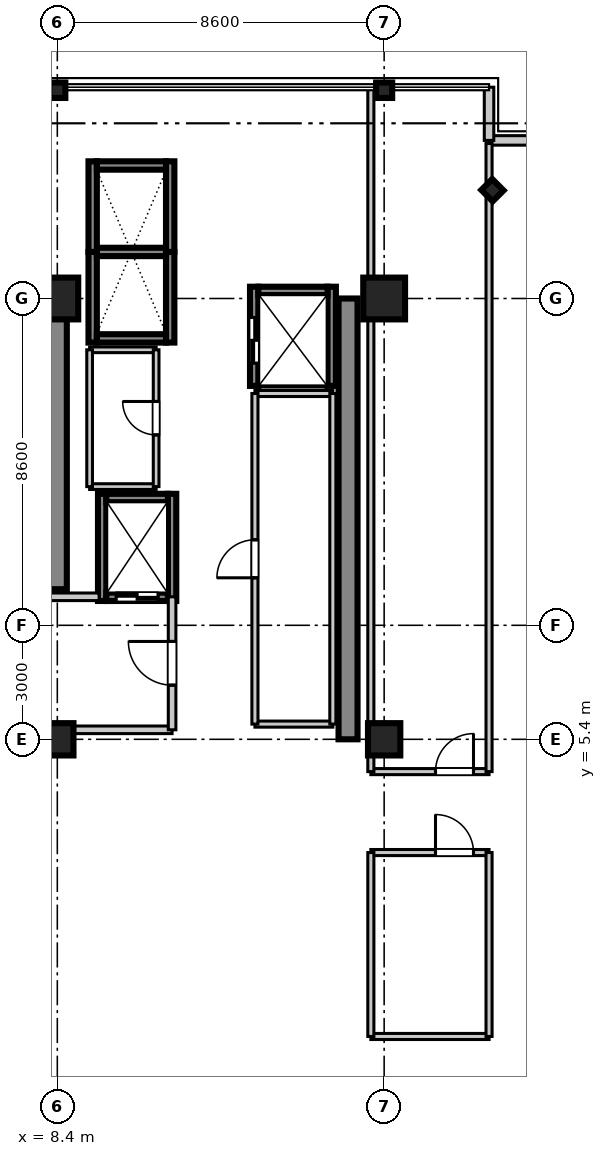
"""IFC4 building model, lengths in metres.
Left out: names, types, materials, properties, quantities, classifications, styles, units other than length and angle.
Written with IfcOpenShell. Run it as: python <this file> out.ifc"""

import sys

from ifc_helpers import new_model, si_unit, direction, frame, frame_2d, origin, origin_2d, place, context, subcontext, project, spatial, rectangle, i_section, extrude, source, transform, mapped, element, fill, save


model = new_model("IFC4")
c1 = context("Model", 3, precision=1e-05, world=origin(), true_north=direction((0.0, 1.0)))
c2 = subcontext(c1, "Body", "Model", "MODEL_VIEW")
j1 = project(units=[si_unit("LENGTHUNIT", "METRE"), si_unit("PLANEANGLEUNIT", "RADIAN")], contexts=[c1])
p1 = place(None, origin())
s1 = spatial("IfcSite", under=j1, at=p1, CompositionType="ELEMENT")
p2 = place(p1, origin())
s2 = spatial("IfcBuilding", under=s1, at=p2, CompositionType="ELEMENT")
p3 = place(p2, frame((0.0, 0.0, 192.8)))
s3 = spatial("IfcBuildingStorey", under=s2, at=p3, CompositionType="ELEMENT", Elevation=192.8)
m1 = source(origin(), c2, "Body", "SweptSolid", [
    extrude(rectangle(XDim=0.85, YDim=0.85, at=origin_2d()), origin(), (0.0, 0.0, 1.0), 3.605),
])
p4 = place(p3, frame((8.4, 5.4, 0.0), z_axis=(0.0, 0.0, 1.0), x_axis=(1.0, 0.0, 0.0)))
e1 = element("IfcColumn", 1, at=p4, inside=s3, PredefinedType="PILASTER", context=c2, shape_type="MappedRepresentation", body=[
    mapped(m1, transform((0.0, 0.0, 0.0), scale=1.0)),
])
m2 = source(origin(), c2, "Body", "SweptSolid", [
    extrude(rectangle(XDim=1.1, YDim=1.1, at=origin_2d()), origin(), (0.0, 0.0, 1.0), 3.605),
])
p5 = place(p3, frame((8.4, 17.0, 0.0), z_axis=(0.0, 0.0, 1.0), x_axis=(1.0, 0.0, 0.0)))
e2 = element("IfcColumn", 2, at=p5, inside=s3, PredefinedType="COLUMN", context=c2, shape_type="MappedRepresentation", body=[
    mapped(m2, transform((0.0, 0.0, 0.0), scale=1.0)),
])
p6 = place(p3, frame((17.0, 5.4, 0.0), z_axis=(0.0, 0.0, 1.0), x_axis=(1.0, 0.0, 0.0)))
e3 = element("IfcColumn", 3, at=p6, inside=s3, PredefinedType="PILASTER", context=c2, shape_type="MappedRepresentation", body=[
    mapped(m1, transform((0.0, 0.0, 0.0), scale=1.0)),
])
p7 = place(p3, frame((17.0, 17.0, 0.0), z_axis=(0.0, 0.0, 1.0), x_axis=(1.0, 0.0, 0.0)))
e4 = element("IfcColumn", 4, at=p7, inside=s3, PredefinedType="COLUMN", context=c2, shape_type="MappedRepresentation", body=[
    mapped(m2, transform((0.0, 0.0, 0.0), scale=1.0)),
])
m3 = source(origin(), c2, "Body", "SweptSolid", [
    extrude(i_section(OverallWidth=0.406, OverallDepth=0.422, WebThickness=0.019, FlangeThickness=0.03, at=origin_2d()), origin(), (0.0, 0.0, 1.0), 3.605),
])
for number, where, z_axis, x_axis in (
    (5, (8.4, 22.48, 0.0), (0.0, 0.0, 1.0), (0.0, 1.0, 0.0)),
    (6, (17.0, 22.48, 0.0), (0.0, 0.0, 1.0), (0.0, 1.0, 0.0)),
    (7, (19.85, 19.85, 0.0), (0.0, 0.0, 1.0), (0.707, 0.707, 0.0)),
):
    element("IfcColumn", number, at=place(p3, frame(where, z_axis=z_axis, x_axis=x_axis)), inside=s3, PredefinedType="COLUMN", context=c2, shape_type="MappedRepresentation", body=[
        mapped(m3, transform((0.0, 0.0, 0.0), scale=1.0)),
    ])
m4 = source(origin(), c2, "Body", "SweptSolid", [
    extrude(rectangle(XDim=7.65, YDim=0.5, at=frame_2d((3.825, 0.0))), origin(), (0.0, 0.0, 1.0), 3.39),
])
p8 = place(p3, frame((8.4, 9.35, 0.0), z_axis=(0.0, 0.0, 1.0), x_axis=(0.0, 1.0, 0.0)))
e8 = element("IfcWall", 8, at=p8, inside=s3, PredefinedType="SHEAR", context=c2, shape_type="MappedRepresentation", body=[
    mapped(m4, transform((0.0, 0.0, 0.0), scale=1.0)),
])
m5 = source(origin(), c2, "Body", "SweptSolid", [
    extrude(rectangle(XDim=11.6, YDim=0.5, at=frame_2d((5.8, 0.0))), origin(), (0.0, 0.0, 1.0), 3.39),
])
p9 = place(p3, frame((16.05, 5.4, 0.0), z_axis=(0.0, 0.0, 1.0), x_axis=(0.0, 1.0, 0.0)))
e9 = element("IfcWall", 9, at=p9, inside=s3, PredefinedType="SHEAR", context=c2, shape_type="MappedRepresentation", body=[
    mapped(m5, transform((0.0, 0.0, 0.0), scale=1.0)),
])
m6 = source(origin(), c2, "Body", "SweptSolid", [
    extrude(rectangle(XDim=2.385, YDim=0.22, at=frame_2d((1.192, 0.0))), origin(), (0.0, 0.0, 1.0), 3.39),
])
for number, where, z_axis, x_axis in (
    (10, (9.33, 15.84, 0.0), (0.0, 0.0, 1.0), (0.0, 1.0, 0.0)),
    (11, (11.37, 15.84, 0.0), (0.0, 0.0, 1.0), (0.0, 1.0, 0.0)),
):
    element("IfcWall", number, at=place(p3, frame(where, z_axis=z_axis, x_axis=x_axis)), inside=s3, PredefinedType="SHEAR", context=c2, shape_type="MappedRepresentation", body=[
        mapped(m6, transform((0.0, 0.0, 0.0), scale=1.0)),
    ])
m7 = source(origin(), c2, "Body", "SweptSolid", [
    extrude(rectangle(XDim=1.82, YDim=0.22, at=frame_2d((0.91, 0.0))), origin(), (0.0, 0.0, 1.0), 3.39),
])
p10 = place(p3, frame((9.44, 15.95, 0.0), z_axis=(0.0, 0.0, 1.0), x_axis=(1.0, 0.0, 0.0)))
e12 = element("IfcWall", 12, at=p10, inside=s3, PredefinedType="SHEAR", context=c2, shape_type="MappedRepresentation", body=[
    mapped(m7, transform((0.0, 0.0, 0.0), scale=1.0)),
])
m8 = source(origin(), c2, "Body", "SweptSolid", [
    extrude(rectangle(XDim=1.82, YDim=0.22, at=frame_2d((0.91, 0.0))), origin(), (0.0, 0.0, 1.0), 3.65),
])
p11 = place(p3, frame((9.44, 18.225, 0.0), z_axis=(0.0, 0.0, 1.0), x_axis=(1.0, 0.0, 0.0)))
e13 = element("IfcWall", 13, at=p11, inside=s3, PredefinedType="SHEAR", context=c2, shape_type="MappedRepresentation", body=[
    mapped(m8, transform((0.0, 0.0, 0.0), scale=1.0)),
])
for number, where, z_axis, x_axis in (
    (14, (9.33, 18.225, 0.0), (0.0, 0.0, 1.0), (0.0, 1.0, 0.0)),
    (15, (11.37, 18.225, 0.0), (0.0, 0.0, 1.0), (0.0, 1.0, 0.0)),
):
    element("IfcWall", number, at=place(p3, frame(where, z_axis=z_axis, x_axis=x_axis)), inside=s3, PredefinedType="SHEAR", context=c2, shape_type="MappedRepresentation", body=[
        mapped(m6, transform((0.0, 0.0, 0.0), scale=1.0)),
    ])
p12 = place(p3, frame((9.44, 20.5, 0.0), z_axis=(0.0, 0.0, 1.0), x_axis=(1.0, 0.0, 0.0)))
e16 = element("IfcWall", 16, at=p12, inside=s3, PredefinedType="SHEAR", context=c2, shape_type="MappedRepresentation", body=[
    mapped(m7, transform((0.0, 0.0, 0.0), scale=1.0)),
])
m9 = source(origin(), c2, "Body", "SweptSolid", [
    extrude(rectangle(XDim=2.82, YDim=0.22, at=frame_2d((1.41, 0.0))), origin(), (0.0, 0.0, 1.0), 3.39),
])
for number, where, z_axis, x_axis in (
    (17, (9.58, 9.04, 0.0), (0.0, 0.0, 1.0), (0.0, 1.0, 0.0)),
    (18, (11.42, 9.04, 0.0), (0.0, 0.0, 1.0), (0.0, 1.0, 0.0)),
):
    element("IfcWall", number, at=place(p3, frame(where, z_axis=z_axis, x_axis=x_axis)), inside=s3, PredefinedType="SHEAR", context=c2, shape_type="MappedRepresentation", body=[
        mapped(m9, transform((0.0, 0.0, 0.0), scale=1.0)),
    ])
m10 = source(origin(), c2, "Body", "SweptSolid", [
    extrude(rectangle(XDim=1.62, YDim=0.22, at=frame_2d((0.81, 0.0))), origin(), (0.0, 0.0, 1.0), 3.39),
])
p13 = place(p3, frame((9.69, 9.15, 0.0), z_axis=(0.0, 0.0, 1.0), x_axis=(1.0, 0.0, 0.0)))
e19 = element("IfcWall", 19, at=p13, inside=s3, PredefinedType="SHEAR", context=c2, shape_type="MappedRepresentation", body=[
    mapped(m10, transform((0.0, 0.0, 0.0), scale=1.0)),
])
p14 = place(p13, frame((0.26, 0.0, 0.0)))
e20 = element("IfcOpeningElement", 20, at=p14, cuts=e19, PredefinedType="OPENING", context=c2, shape_type="SweptSolid", body=[
    extrude(rectangle(XDim=1.1, YDim=2.2, at=frame_2d((0.55, 1.1))), frame((0.0, 0.12, 0.0), z_axis=(0.0, -1.0, 0.0), x_axis=(1.0, 0.0, 0.0)), (0.0, 0.0, 1.0), 0.24),
])
p15 = place(p3, frame((9.69, 11.75, 0.0), z_axis=(0.0, 0.0, 1.0), x_axis=(1.0, 0.0, 0.0)))
e21 = element("IfcWall", 21, at=p15, inside=s3, PredefinedType="SHEAR", context=c2, shape_type="MappedRepresentation", body=[
    mapped(m10, transform((0.0, 0.0, 0.0), scale=1.0)),
])
m11 = source(origin(), c2, "Body", "SweptSolid", [
    extrude(rectangle(XDim=2.61, YDim=0.22, at=frame_2d((1.305, 0.0))), origin(), (0.0, 0.0, 1.0), 3.39),
])
p16 = place(p3, frame((13.58, 14.7, 0.0), z_axis=(0.0, 0.0, 1.0), x_axis=(0.0, 1.0, 0.0)))
e22 = element("IfcWall", 22, at=p16, inside=s3, PredefinedType="SHEAR", context=c2, shape_type="MappedRepresentation", body=[
    mapped(m11, transform((0.0, 0.0, 0.0), scale=1.0)),
])
p17 = place(p16, frame((0.6, 0.0, 0.0)))
e23 = element("IfcOpeningElement", 23, at=p17, cuts=e22, PredefinedType="OPENING", context=c2, shape_type="SweptSolid", body=[
    extrude(rectangle(XDim=1.2, YDim=2.2, at=frame_2d((0.6, 1.1))), frame((0.0, 0.12, 0.0), z_axis=(0.0, -1.0, 0.0), x_axis=(1.0, 0.0, 0.0)), (0.0, 0.0, 1.0), 0.24),
])
p18 = place(p3, frame((15.62, 14.7, 0.0), z_axis=(0.0, 0.0, 1.0), x_axis=(0.0, 1.0, 0.0)))
e24 = element("IfcWall", 24, at=p18, inside=s3, PredefinedType="SHEAR", context=c2, shape_type="MappedRepresentation", body=[
    mapped(m11, transform((0.0, 0.0, 0.0), scale=1.0)),
])
p19 = place(p3, frame((13.69, 17.2, 0.0), z_axis=(0.0, 0.0, 1.0), x_axis=(1.0, 0.0, 0.0)))
e25 = element("IfcWall", 25, at=p19, inside=s3, PredefinedType="SHEAR", context=c2, shape_type="MappedRepresentation", body=[
    mapped(m7, transform((0.0, 0.0, 0.0), scale=1.0)),
])
m12 = source(origin(), c2, "Body", "SweptSolid", [
    extrude(rectangle(XDim=1.4, YDim=0.25, at=frame_2d((0.7, 0.0))), origin(), (0.0, 0.0, 1.0), 3.39),
])
p20 = place(p3, frame((19.76, 21.16, 0.0), z_axis=(0.0, 0.0, 1.0), x_axis=(1.0, 0.0, 0.0)))
e26 = element("IfcWall", 26, at=p20, inside=s3, PredefinedType="STANDARD", context=c2, shape_type="MappedRepresentation", body=[
    mapped(m12, transform((0.0, 0.0, 0.0), scale=1.0)),
])
m13 = source(origin(), c2, "Body", "SweptSolid", [
    extrude(rectangle(XDim=1.4, YDim=0.25, at=frame_2d((0.7, 0.0))), origin(), (0.0, 0.0, 1.0), 3.39),
])
p21 = place(p3, frame((19.76, 21.16, 0.0), z_axis=(0.0, 0.0, 1.0), x_axis=(0.0, 1.0, 0.0)))
e27 = element("IfcWall", 27, at=p21, inside=s3, PredefinedType="STANDARD", context=c2, shape_type="MappedRepresentation", body=[
    mapped(m13, transform((0.0, 0.0, 0.0), scale=1.0)),
])
m14 = source(origin(), c2, "Body", "SweptSolid", [
    extrude(rectangle(XDim=3.82, YDim=0.2, at=frame_2d((1.91, 0.0))), origin(), (0.0, 0.0, 1.0), 2.73),
])
p22 = place(p3, frame((7.6, 5.65, 0.0), z_axis=(0.0, 0.0, 1.0), x_axis=(1.0, 0.0, 0.0)))
e28 = element("IfcWall", 28, at=p22, inside=s3, PredefinedType="PARTITIONING", context=c2, shape_type="MappedRepresentation", body=[
    mapped(m14, transform((0.0, 0.0, 0.0), scale=1.0)),
])
m15 = source(origin(), c2, "Body", "SweptSolid", [
    extrude(rectangle(XDim=1.9, YDim=0.2, at=frame_2d((0.95, 0.0))), origin(), (0.0, 0.0, 1.0), 2.73),
])
p23 = place(p3, frame((7.6, 9.15, 0.0), z_axis=(0.0, 0.0, 1.0), x_axis=(1.0, 0.0, 0.0)))
e29 = element("IfcWall", 29, at=p23, inside=s3, PredefinedType="PARTITIONING", context=c2, shape_type="MappedRepresentation", body=[
    mapped(m15, transform((0.0, 0.0, 0.0), scale=1.0)),
])
m16 = source(origin(), c2, "Body", "SweptSolid", [
    extrude(rectangle(XDim=3.5, YDim=0.2, at=frame_2d((1.75, 0.0))), origin(), (0.0, 0.0, 1.0), 2.73),
])
p24 = place(p3, frame((11.42, 5.65, 0.0), z_axis=(0.0, 0.0, 1.0), x_axis=(0.0, 1.0, 0.0)))
e30 = element("IfcWall", 30, at=p24, inside=s3, PredefinedType="PARTITIONING", context=c2, shape_type="MappedRepresentation", body=[
    mapped(m16, transform((0.0, 0.0, 0.0), scale=1.0)),
])
p25 = place(p24, frame((1.175, 0.0, 0.0)))
e31 = element("IfcOpeningElement", 31, at=p25, cuts=e30, PredefinedType="OPENING", context=c2, shape_type="SweptSolid", body=[
    extrude(rectangle(XDim=1.15, YDim=2.15, at=frame_2d((0.575, 1.075))), frame((0.0, 0.11, 0.0), z_axis=(0.0, -1.0, 0.0), x_axis=(1.0, 0.0, 0.0)), (0.0, 0.0, 1.0), 0.22),
])
m17 = source(origin(), c2, "Body", "SweptSolid", [
    extrude(rectangle(XDim=1.75, YDim=0.15, at=frame_2d((0.875, 0.0))), origin(), (0.0, 0.0, 1.0), 2.73),
])
for number, where, z_axis, x_axis in (
    (32, (9.25, 12.05, 0.0), (0.0, 0.0, 1.0), (1.0, 0.0, 0.0)),
    (33, (9.25, 15.65, 0.0), (0.0, 0.0, 1.0), (1.0, 0.0, 0.0)),
):
    element("IfcWall", number, at=place(p3, frame(where, z_axis=z_axis, x_axis=x_axis)), inside=s3, PredefinedType="PARTITIONING", context=c2, shape_type="MappedRepresentation", body=[
        mapped(m17, transform((0.0, 0.0, 0.0), scale=1.0)),
    ])
m18 = source(origin(), c2, "Body", "SweptSolid", [
    extrude(rectangle(XDim=3.6, YDim=0.15, at=frame_2d((1.8, 0.0))), origin(), (0.0, 0.0, 1.0), 2.73),
])
p26 = place(p3, frame((9.25, 12.05, 0.0), z_axis=(0.0, 0.0, 1.0), x_axis=(0.0, 1.0, 0.0)))
e34 = element("IfcWall", 34, at=p26, inside=s3, PredefinedType="PARTITIONING", context=c2, shape_type="MappedRepresentation", body=[
    mapped(m18, transform((0.0, 0.0, 0.0), scale=1.0)),
])
p27 = place(p3, frame((11.0, 12.05, 0.0), z_axis=(0.0, 0.0, 1.0), x_axis=(0.0, 1.0, 0.0)))
e35 = element("IfcWall", 35, at=p27, inside=s3, PredefinedType="PARTITIONING", context=c2, shape_type="MappedRepresentation", body=[
    mapped(m18, transform((0.0, 0.0, 0.0), scale=1.0)),
])
p28 = place(p27, frame((1.36, 0.0, 0.0)))
e36 = element("IfcOpeningElement", 36, at=p28, cuts=e35, PredefinedType="OPENING", context=c2, shape_type="SweptSolid", body=[
    extrude(rectangle(XDim=0.88, YDim=2.1, at=frame_2d((0.44, 1.05))), frame((0.0, 0.085, 0.0), z_axis=(0.0, -1.0, 0.0), x_axis=(1.0, 0.0, 0.0)), (0.0, 0.0, 1.0), 0.17),
])
m19 = source(origin(), c2, "Body", "SweptSolid", [
    extrude(rectangle(XDim=2.05, YDim=0.16, at=frame_2d((1.025, 0.0))), origin(), (0.0, 0.0, 1.0), 2.73),
])
for number, where, z_axis, x_axis in (
    (37, (13.6, 5.8, 0.0), (0.0, 0.0, 1.0), (1.0, 0.0, 0.0)),
    (38, (13.6, 14.5, 0.0), (0.0, 0.0, 1.0), (1.0, 0.0, 0.0)),
):
    element("IfcWall", number, at=place(p3, frame(where, z_axis=z_axis, x_axis=x_axis)), inside=s3, PredefinedType="PARTITIONING", context=c2, shape_type="MappedRepresentation", body=[
        mapped(m19, transform((0.0, 0.0, 0.0), scale=1.0)),
    ])
m20 = source(origin(), c2, "Body", "SweptSolid", [
    extrude(rectangle(XDim=8.7, YDim=0.16, at=frame_2d((4.35, 0.0))), origin(), (0.0, 0.0, 1.0), 2.73),
])
p29 = place(p3, frame((13.6, 5.8, 0.0), z_axis=(0.0, 0.0, 1.0), x_axis=(0.0, 1.0, 0.0)))
e39 = element("IfcWall", 39, at=p29, inside=s3, PredefinedType="PARTITIONING", context=c2, shape_type="MappedRepresentation", body=[
    mapped(m20, transform((0.0, 0.0, 0.0), scale=1.0)),
])
p30 = place(p29, frame((3.85, 0.0, 0.0)))
e40 = element("IfcOpeningElement", 40, at=p30, cuts=e39, PredefinedType="OPENING", context=c2, shape_type="SweptSolid", body=[
    extrude(rectangle(XDim=1.0, YDim=2.1, at=frame_2d((0.5, 1.05))), frame((0.0, 0.09, 0.0), z_axis=(0.0, -1.0, 0.0), x_axis=(1.0, 0.0, 0.0)), (0.0, 0.0, 1.0), 0.18),
])
p31 = place(p3, frame((15.65, 5.8, 0.0), z_axis=(0.0, 0.0, 1.0), x_axis=(0.0, 1.0, 0.0)))
e41 = element("IfcWall", 41, at=p31, inside=s3, PredefinedType="PARTITIONING", context=c2, shape_type="MappedRepresentation", body=[
    mapped(m20, transform((0.0, 0.0, 0.0), scale=1.0)),
])
m21 = source(origin(), c2, "Body", "SweptSolid", [
    extrude(rectangle(XDim=3.11, YDim=0.16, at=frame_2d((1.555, 0.0))), origin(), (0.0, 0.0, 1.0), 2.73),
])
p32 = place(p3, frame((16.65, 4.55, 0.0), z_axis=(0.0, 0.0, 1.0), x_axis=(1.0, 0.0, 0.0)))
e42 = element("IfcWall", 42, at=p32, inside=s3, PredefinedType="PARTITIONING", context=c2, shape_type="MappedRepresentation", body=[
    mapped(m21, transform((0.0, 0.0, 0.0), scale=1.0)),
])
p33 = place(p32, frame((1.701, 0.0, 0.0)))
e43 = element("IfcOpeningElement", 43, at=p33, cuts=e42, PredefinedType="OPENING", context=c2, shape_type="SweptSolid", body=[
    extrude(rectangle(XDim=1.0, YDim=2.1, at=frame_2d((0.5, 1.05))), frame((0.0, 0.09, 0.0), z_axis=(0.0, -1.0, 0.0), x_axis=(1.0, 0.0, 0.0)), (0.0, 0.0, 1.0), 0.18),
])
m22 = source(origin(), c2, "Body", "SweptSolid", [
    extrude(rectangle(XDim=17.95, YDim=0.16, at=frame_2d((8.975, 0.0))), origin(), (0.0, 0.0, 1.0), 2.73),
])
p34 = place(p3, frame((16.65, 4.55, 0.0), z_axis=(0.0, 0.0, 1.0), x_axis=(0.0, 1.0, 0.0)))
e44 = element("IfcWall", 44, at=p34, inside=s3, PredefinedType="PARTITIONING", context=c2, shape_type="MappedRepresentation", body=[
    mapped(m22, transform((0.0, 0.0, 0.0), scale=1.0)),
])
m23 = source(origin(), c2, "Body", "SweptSolid", [
    extrude(rectangle(XDim=16.53, YDim=0.16, at=frame_2d((8.265, 0.0))), origin(), (0.0, 0.0, 1.0), 2.73),
])
p35 = place(p3, frame((19.76, 4.55, 0.0), z_axis=(0.0, 0.0, 1.0), x_axis=(0.0, 1.0, 0.0)))
e45 = element("IfcWall", 45, at=p35, inside=s3, PredefinedType="PARTITIONING", context=c2, shape_type="MappedRepresentation", body=[
    mapped(m23, transform((0.0, 0.0, 0.0), scale=1.0)),
])
p36 = place(p3, frame((16.65, -2.42, 0.0), z_axis=(0.0, 0.0, 1.0), x_axis=(1.0, 0.0, 0.0)))
e46 = element("IfcWall", 46, at=p36, inside=s3, PredefinedType="PARTITIONING", context=c2, shape_type="MappedRepresentation", body=[
    mapped(m21, transform((0.0, 0.0, 0.0), scale=1.0)),
])
p37 = place(p3, frame((16.65, 2.42, 0.0), z_axis=(0.0, 0.0, 1.0), x_axis=(1.0, 0.0, 0.0)))
e47 = element("IfcWall", 47, at=p37, inside=s3, PredefinedType="PARTITIONING", context=c2, shape_type="MappedRepresentation", body=[
    mapped(m21, transform((0.0, 0.0, 0.0), scale=1.0)),
])
p38 = place(p37, frame((1.701, 0.0, 0.0)))
e48 = element("IfcOpeningElement", 48, at=p38, cuts=e47, PredefinedType="OPENING", context=c2, shape_type="SweptSolid", body=[
    extrude(rectangle(XDim=1.0, YDim=2.1, at=frame_2d((0.5, 1.05))), frame((0.0, 0.09, 0.0), z_axis=(0.0, -1.0, 0.0), x_axis=(1.0, 0.0, 0.0)), (0.0, 0.0, 1.0), 0.18),
])
m24 = source(origin(), c2, "Body", "SweptSolid", [
    extrude(rectangle(XDim=4.84, YDim=0.16, at=frame_2d((2.42, 0.0))), origin(), (0.0, 0.0, 1.0), 2.73),
])
for number, where, z_axis, x_axis in (
    (49, (16.65, -2.42, 0.0), (0.0, 0.0, 1.0), (0.0, 1.0, 0.0)),
    (50, (19.76, -2.42, 0.0), (0.0, 0.0, 1.0), (0.0, 1.0, 0.0)),
):
    element("IfcWall", number, at=place(p3, frame(where, z_axis=z_axis, x_axis=x_axis)), inside=s3, PredefinedType="PARTITIONING", context=c2, shape_type="MappedRepresentation", body=[
        mapped(m24, transform((0.0, 0.0, 0.0), scale=1.0)),
    ])
m25 = source(origin(), c2, "Body", "SweptSolid", [
    extrude(rectangle(XDim=1.1, YDim=2.2, at=frame_2d((0.55, 1.1))), frame((0.0, 0.025, 0.0), z_axis=(0.0, -1.0, 0.0), x_axis=(1.0, 0.0, 0.0)), (0.0, 0.0, 1.0), 0.05),
])
p39 = place(p14, frame((1.1, 0.0, 0.0), z_axis=(0.0, 0.0, 1.0), x_axis=(-1.0, 0.0, 0.0)))
e51 = element("IfcDoor", 51, at=p39, inside=s3, OperationType="DOUBLE_DOOR_SLIDING", PredefinedType="DOOR", context=c2, shape_type="MappedRepresentation", body=[
    mapped(m25, transform((0.0, 0.0, 0.0), scale=1.0)),
])
fill(e20, e51)
m26 = source(origin(), c2, "Body", "SweptSolid", [
    extrude(rectangle(XDim=1.2, YDim=2.2, at=frame_2d((0.6, 1.1))), frame((0.0, 0.025, 0.0), z_axis=(0.0, -1.0, 0.0), x_axis=(1.0, 0.0, 0.0)), (0.0, 0.0, 1.0), 0.05),
])
p40 = place(p17, origin())
e52 = element("IfcDoor", 52, at=p40, inside=s3, OperationType="DOUBLE_DOOR_SLIDING", PredefinedType="DOOR", context=c2, shape_type="MappedRepresentation", body=[
    mapped(m26, transform((0.0, 0.0, 0.0), scale=1.0)),
])
fill(e23, e52)
m27 = source(origin(), c2, "Body", "SweptSolid", [
    extrude(rectangle(XDim=1.15, YDim=2.15, at=frame_2d((0.575, 1.075))), frame((0.0, 0.025, 0.0), z_axis=(0.0, -1.0, 0.0), x_axis=(1.0, 0.0, 0.0)), (0.0, 0.0, 1.0), 0.05),
])
p41 = place(p25, frame((1.15, 0.0, 0.0), z_axis=(0.0, 0.0, 1.0), x_axis=(-1.0, 0.0, 0.0)))
e53 = element("IfcDoor", 53, at=p41, inside=s3, OperationType="SINGLE_SWING_RIGHT", PredefinedType="DOOR", context=c2, shape_type="MappedRepresentation", body=[
    mapped(m27, transform((0.0, 0.0, 0.0), scale=1.0)),
])
fill(e31, e53)
m28 = source(origin(), c2, "Body", "SweptSolid", [
    extrude(rectangle(XDim=0.88, YDim=2.1, at=frame_2d((0.44, 1.05))), frame((0.0, 0.025, 0.0), z_axis=(0.0, -1.0, 0.0), x_axis=(1.0, 0.0, 0.0)), (0.0, 0.0, 1.0), 0.05),
])
p42 = place(p28, origin())
e54 = element("IfcDoor", 54, at=p42, inside=s3, OperationType="SINGLE_SWING_RIGHT", PredefinedType="DOOR", context=c2, shape_type="MappedRepresentation", body=[
    mapped(m28, transform((0.0, 0.0, 0.0), scale=1.0)),
])
fill(e36, e54)
m29 = source(origin(), c2, "Body", "SweptSolid", [
    extrude(rectangle(XDim=1.0, YDim=2.1, at=frame_2d((0.5, 1.05))), frame((0.0, 0.025, 0.0), z_axis=(0.0, -1.0, 0.0), x_axis=(1.0, 0.0, 0.0)), (0.0, 0.0, 1.0), 0.05),
])
p43 = place(p30, frame((1.0, 0.0, 0.0), z_axis=(0.0, 0.0, 1.0), x_axis=(-1.0, 0.0, 0.0)))
e55 = element("IfcDoor", 55, at=p43, inside=s3, OperationType="SINGLE_SWING_LEFT", PredefinedType="DOOR", context=c2, shape_type="MappedRepresentation", body=[
    mapped(m29, transform((0.0, 0.0, 0.0), scale=1.0)),
])
fill(e40, e55)
p44 = place(p33, origin())
e56 = element("IfcDoor", 56, at=p44, inside=s3, OperationType="SINGLE_SWING_RIGHT", PredefinedType="DOOR", context=c2, shape_type="MappedRepresentation", body=[
    mapped(m29, transform((0.0, 0.0, 0.0), scale=1.0)),
])
fill(e43, e56)
p45 = place(p38, frame((1.0, 0.0, 0.0), z_axis=(0.0, 0.0, 1.0), x_axis=(-1.0, 0.0, 0.0)))
e57 = element("IfcDoor", 57, at=p45, inside=s3, OperationType="SINGLE_SWING_LEFT", PredefinedType="DOOR", context=c2, shape_type="MappedRepresentation", body=[
    mapped(m29, transform((0.0, 0.0, 0.0), scale=1.0)),
])
fill(e48, e57)
save(model, sys.argv[1])
